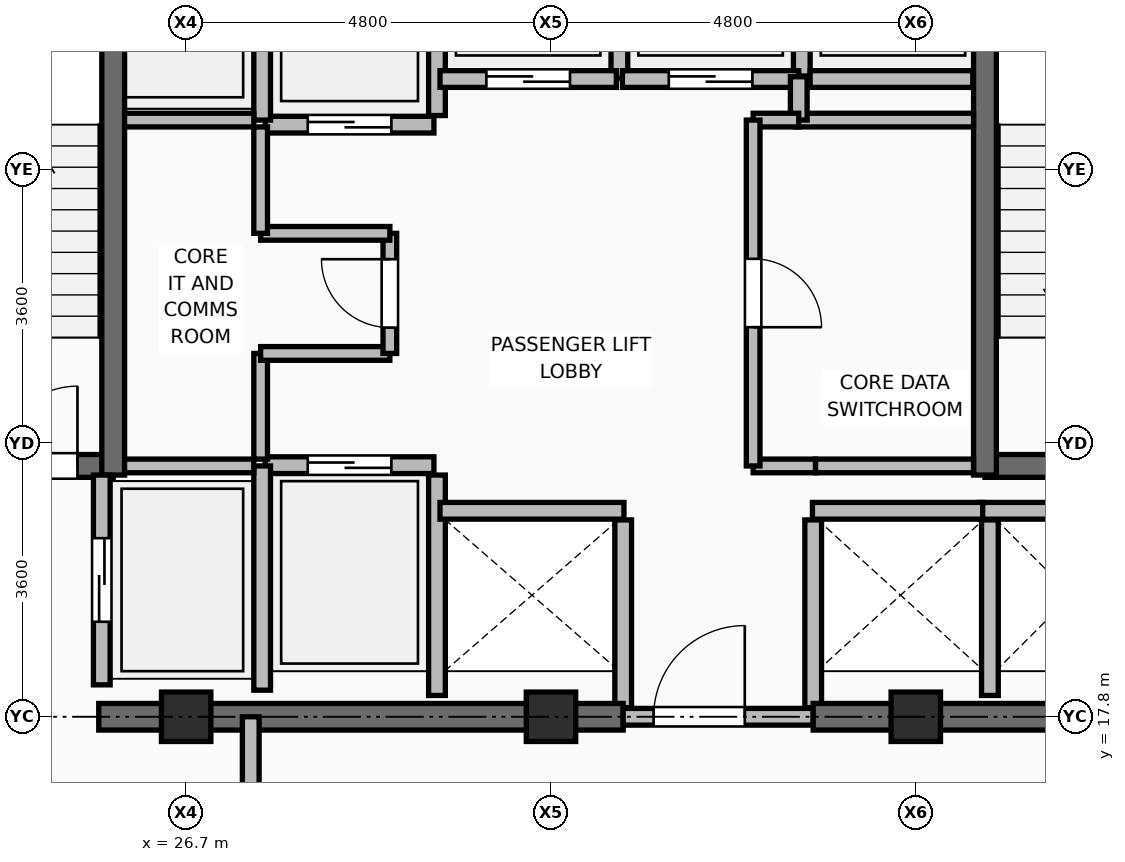
"""IFC4 building model, lengths in metres.
Left out: names, types, materials, properties, quantities, classifications, styles, units other than length and angle.
Written with IfcOpenShell. Run it as: python <this file> out.ifc"""

import sys

from ifc_helpers import new_model, si_unit, direction, frame, frame_2d, origin, origin_2d, place, context, subcontext, project, spatial, rectangle, extrude, element, fill, save


model = new_model("IFC4")
c1 = context("Model", 3, precision=1e-05, world=origin(), true_north=direction((0.0, 1.0)))
c2 = subcontext(c1, "Body", "Model", "MODEL_VIEW")
j1 = project(units=[si_unit("LENGTHUNIT", "METRE"), si_unit("PLANEANGLEUNIT", "RADIAN")], contexts=[c1])
p1 = place(None, origin())
s1 = spatial("IfcSite", under=j1, at=p1, CompositionType="ELEMENT")
p2 = place(p1, origin())
s2 = spatial("IfcBuilding", under=s1, at=p2, CompositionType="ELEMENT")
p3 = place(p2, frame((0.0, 0.0, 275.1)))
s3 = spatial("IfcBuildingStorey", under=s2, at=p3, CompositionType="ELEMENT", Elevation=275.1)
for number, where, z_axis, x_axis in (
    (1, (26.7, 17.8, 0.0), (0.0, 0.0, 1.0), (1.0, 0.0, 0.0)),
    (2, (31.5, 17.8, 0.0), (0.0, 0.0, 1.0), (1.0, 0.0, 0.0)),
    (3, (36.3, 17.8, 0.0), (0.0, 0.0, 1.0), (1.0, 0.0, 0.0)),
):
    element("IfcColumn", number, at=place(p3, frame(where, z_axis=z_axis, x_axis=x_axis)), inside=s3, PredefinedType="COLUMN", context=c2, shape_type="SweptSolid", body=[
        extrude(rectangle(XDim=0.65, YDim=0.65, at=origin_2d()), origin(), (0.0, 0.0, 1.0), 3.75),
    ])
p4 = place(p3, frame((30.0, 18.08, 0.0), z_axis=(0.0, 0.0, 1.0), x_axis=(0.0, 1.0, 0.0)))
e4 = element("IfcWall", 4, at=p4, inside=s3, PredefinedType="PARTITIONING", context=c2, shape_type="SweptSolid", body=[
    extrude(rectangle(XDim=2.9, YDim=0.22, at=frame_2d((1.45, 0.0))), origin(), (0.0, 0.0, 1.0), 3.545),
])
for number, where, z_axis, x_axis in (
    (5, (32.45, 17.92, 0.0), (0.0, 0.0, 1.0), (0.0, 1.0, 0.0)),
    (6, (34.95, 17.92, 0.0), (0.0, 0.0, 1.0), (0.0, 1.0, 0.0)),
):
    element("IfcWall", number, at=place(p3, frame(where, z_axis=z_axis, x_axis=x_axis)), inside=s3, PredefinedType="PARTITIONING", context=c2, shape_type="SweptSolid", body=[
        extrude(rectangle(XDim=2.47, YDim=0.22, at=frame_2d((1.235, 0.0))), origin(), (0.0, 0.0, 1.0), 3.545),
    ])
p5 = place(p3, frame((37.275, 18.08, 0.0), z_axis=(0.0, 0.0, 1.0), x_axis=(0.0, 1.0, 0.0)))
e7 = element("IfcWall", 7, at=p5, inside=s3, PredefinedType="PARTITIONING", context=c2, shape_type="SweptSolid", body=[
    extrude(rectangle(XDim=2.31, YDim=0.22, at=frame_2d((1.155, 0.0))), origin(), (0.0, 0.0, 1.0), 3.545),
])
p6 = place(p3, frame((30.0, 25.71, 0.0), z_axis=(0.0, 0.0, 1.0), x_axis=(0.0, 1.0, 0.0)))
e8 = element("IfcWall", 8, at=p6, inside=s3, PredefinedType="PARTITIONING", context=c2, shape_type="SweptSolid", body=[
    extrude(rectangle(XDim=2.73, YDim=0.22, at=frame_2d((1.365, 0.0))), origin(), (0.0, 0.0, 1.0), 3.545),
])
p7 = place(p3, frame((32.4, 26.2, 0.0), z_axis=(0.0, 0.0, 1.0), x_axis=(0.0, 1.0, 0.0)))
e9 = element("IfcWall", 9, at=p7, inside=s3, PredefinedType="PARTITIONING", context=c2, shape_type="SweptSolid", body=[
    extrude(rectangle(XDim=2.24, YDim=0.22, at=frame_2d((1.12, 0.0))), origin(), (0.0, 0.0, 1.0), 3.545),
])
p8 = place(p3, frame((34.8, 26.23, 0.0), z_axis=(0.0, 0.0, 1.0), x_axis=(0.0, 1.0, 0.0)))
e10 = element("IfcWall", 10, at=p8, inside=s3, PredefinedType="PARTITIONING", context=c2, shape_type="SweptSolid", body=[
    extrude(rectangle(XDim=2.21, YDim=0.22, at=frame_2d((1.105, 0.0))), origin(), (0.0, 0.0, 1.0), 3.545),
])
p9 = place(p3, frame((34.91, 26.19, 0.0), z_axis=(0.0, 0.0, 1.0), x_axis=(1.0, 0.0, 0.0)))
e11 = element("IfcWall", 11, at=p9, inside=s3, PredefinedType="PARTITIONING", context=c2, shape_type="SweptSolid", body=[
    extrude(rectangle(XDim=2.14, YDim=0.22, at=frame_2d((1.07, 0.0))), origin(), (0.0, 0.0, 1.0), 3.545),
])
p10 = place(p3, frame((25.55, 17.8, 0.0), z_axis=(0.0, 0.0, 1.0), x_axis=(1.0, 0.0, 0.0)))
e12 = element("IfcWall", 12, at=p10, inside=s3, PredefinedType="SHEAR", context=c2, shape_type="SweptSolid", body=[
    extrude(rectangle(XDim=6.9, YDim=0.35, at=frame_2d((3.45, 0.0))), origin(), (0.0, 0.0, 1.0), 3.57),
])
p11 = place(p3, frame((32.45, 17.8, 0.0), z_axis=(0.0, 0.0, 1.0), x_axis=(1.0, 0.0, 0.0)))
e13 = element("IfcWall", 13, at=p11, inside=s3, PredefinedType="PARTITIONING", context=c2, shape_type="SweptSolid", body=[
    extrude(rectangle(XDim=2.5, YDim=0.22, at=frame_2d((1.25, 0.0))), origin(), (0.0, 0.0, 1.0), 3.132),
])
p12 = place(p11, frame((0.4, 0.0, 0.0)))
e14 = element("IfcOpeningElement", 14, at=p12, cuts=e13, PredefinedType="OPENING", context=c2, shape_type="SweptSolid", body=[
    extrude(rectangle(XDim=1.2, YDim=2.1, at=frame_2d((0.6, 1.05))), frame((0.0, 0.12, 0.0), z_axis=(0.0, -1.0, 0.0), x_axis=(1.0, 0.0, 0.0)), (0.0, 0.0, 1.0), 0.24),
])
p13 = place(p3, frame((34.95, 17.8, 0.0), z_axis=(0.0, 0.0, 1.0), x_axis=(1.0, 0.0, 0.0)))
e15 = element("IfcWall", 15, at=p13, inside=s3, PredefinedType="SHEAR", context=c2, shape_type="SweptSolid", body=[
    extrude(rectangle(XDim=6.325, YDim=0.35, at=frame_2d((3.163, 0.0))), origin(), (0.0, 0.0, 1.0), 3.57),
])
p14 = place(p3, frame((22.075, 21.1, 0.0), z_axis=(0.0, 0.0, 1.0), x_axis=(1.0, 0.0, 0.0)))
e16 = element("IfcWall", 16, at=p14, inside=s3, PredefinedType="SHEAR", context=c2, shape_type="SweptSolid", body=[
    extrude(rectangle(XDim=3.665, YDim=0.3, at=frame_2d((1.833, 0.0))), origin(), (0.0, 0.0, 1.0), 3.57),
])
p15 = place(p14, frame((2.145, 0.0, 0.0)))
e17 = element("IfcOpeningElement", 17, at=p15, cuts=e16, PredefinedType="OPENING", context=c2, shape_type="SweptSolid", body=[
    extrude(rectangle(XDim=1.05, YDim=2.1, at=frame_2d((0.525, 1.05))), frame((0.0, 0.16, 0.0), z_axis=(0.0, -1.0, 0.0), x_axis=(1.0, 0.0, 0.0)), (0.0, 0.0, 1.0), 0.32),
])
p16 = place(p3, frame((25.74, 20.98, 0.0), z_axis=(0.0, 0.0, 1.0), x_axis=(0.0, 1.0, 0.0)))
e18 = element("IfcWall", 18, at=p16, inside=s3, PredefinedType="SHEAR", context=c2, shape_type="SweptSolid", body=[
    extrude(rectangle(XDim=7.99, YDim=0.3, at=frame_2d((3.995, 0.0))), origin(), (0.0, 0.0, 1.0), 3.57),
])
p17 = place(p3, frame((37.21, 21.1, 0.0), z_axis=(0.0, 0.0, 1.0), x_axis=(1.0, 0.0, 0.0)))
e19 = element("IfcWall", 19, at=p17, inside=s3, PredefinedType="SHEAR", context=c2, shape_type="SweptSolid", body=[
    extrude(rectangle(XDim=3.715, YDim=0.3, at=frame_2d((1.857, 0.0))), origin(), (0.0, 0.0, 1.0), 3.57),
])
p18 = place(p3, frame((37.21, 20.98, 0.0), z_axis=(0.0, 0.0, 1.0), x_axis=(0.0, 1.0, 0.0)))
e20 = element("IfcWall", 20, at=p18, inside=s3, PredefinedType="SHEAR", context=c2, shape_type="SweptSolid", body=[
    extrude(rectangle(XDim=7.99, YDim=0.3, at=frame_2d((3.995, 0.0))), origin(), (0.0, 0.0, 1.0), 3.57),
])
p19 = place(p3, frame((25.59, 18.22, 0.0), z_axis=(0.0, 0.0, 1.0), x_axis=(0.0, 1.0, 0.0)))
e21 = element("IfcWall", 21, at=p19, inside=s3, PredefinedType="PARTITIONING", context=c2, shape_type="SweptSolid", body=[
    extrude(rectangle(XDim=2.76, YDim=0.22, at=frame_2d((1.38, 0.0))), origin(), (0.0, 0.0, 1.0), 3.55),
])
p20 = place(p19, frame((0.83, 0.0, 0.0)))
e22 = element("IfcOpeningElement", 22, at=p20, cuts=e21, PredefinedType="OPENING", context=c2, shape_type="SweptSolid", body=[
    extrude(rectangle(XDim=1.1, YDim=2.2, at=frame_2d((0.55, 1.1))), frame((0.0, 0.12, 0.0), z_axis=(0.0, -1.0, 0.0), x_axis=(1.0, 0.0, 0.0)), (0.0, 0.0, 1.0), 0.24),
])
p21 = place(p3, frame((27.74, 21.11, 0.0), z_axis=(0.0, 0.0, 1.0), x_axis=(1.0, 0.0, 0.0)))
e23 = element("IfcWall", 23, at=p21, inside=s3, PredefinedType="PARTITIONING", context=c2, shape_type="SweptSolid", body=[
    extrude(rectangle(XDim=2.22, YDim=0.22, at=frame_2d((1.11, 0.0))), origin(), (0.0, 0.0, 1.0), 3.55),
])
p22 = place(p21, frame((0.56, 0.0, 0.0)))
e24 = element("IfcOpeningElement", 24, at=p22, cuts=e23, PredefinedType="OPENING", context=c2, shape_type="SweptSolid", body=[
    extrude(rectangle(XDim=1.1, YDim=2.2, at=frame_2d((0.55, 1.1))), frame((0.0, 0.12, 0.0), z_axis=(0.0, -1.0, 0.0), x_axis=(1.0, 0.0, 0.0)), (0.0, 0.0, 1.0), 0.24),
])
p23 = place(p3, frame((27.74, 25.59, 0.0), z_axis=(0.0, 0.0, 1.0), x_axis=(1.0, 0.0, 0.0)))
e25 = element("IfcWall", 25, at=p23, inside=s3, PredefinedType="PARTITIONING", context=c2, shape_type="SweptSolid", body=[
    extrude(rectangle(XDim=2.22, YDim=0.22, at=frame_2d((1.11, 0.0))), origin(), (0.0, 0.0, 1.0), 3.55),
])
p24 = place(p23, frame((0.56, 0.0, 0.0)))
e26 = element("IfcOpeningElement", 26, at=p24, cuts=e25, PredefinedType="OPENING", context=c2, shape_type="SweptSolid", body=[
    extrude(rectangle(XDim=1.1, YDim=2.2, at=frame_2d((0.55, 1.1))), frame((0.0, 0.12, 0.0), z_axis=(0.0, -1.0, 0.0), x_axis=(1.0, 0.0, 0.0)), (0.0, 0.0, 1.0), 0.24),
])
p25 = place(p3, frame((30.04, 20.51, 0.0), z_axis=(0.0, 0.0, 1.0), x_axis=(1.0, 0.0, 0.0)))
e27 = element("IfcWall", 27, at=p25, inside=s3, PredefinedType="PARTITIONING", context=c2, shape_type="SweptSolid", body=[
    extrude(rectangle(XDim=2.42, YDim=0.22, at=frame_2d((1.21, 0.0))), origin(), (0.0, 0.0, 1.0), 3.55),
])
for number, where, z_axis, x_axis in (
    (28, (37.14, 20.51, 0.0), (0.0, 0.0, 1.0), (1.0, 0.0, 0.0)),
    (29, (34.94, 20.51, 0.0), (0.0, 0.0, 1.0), (1.0, 0.0, 0.0)),
):
    element("IfcWall", number, at=place(p3, frame(where, z_axis=z_axis, x_axis=x_axis)), inside=s3, PredefinedType="PARTITIONING", context=c2, shape_type="SweptSolid", body=[
        extrude(rectangle(XDim=2.24, YDim=0.22, at=frame_2d((1.12, 0.0))), origin(), (0.0, 0.0, 1.0), 3.55),
    ])
p26 = place(p3, frame((30.04, 26.19, 0.0), z_axis=(0.0, 0.0, 1.0), x_axis=(1.0, 0.0, 0.0)))
e30 = element("IfcWall", 30, at=p26, inside=s3, PredefinedType="PARTITIONING", context=c2, shape_type="SweptSolid", body=[
    extrude(rectangle(XDim=2.32, YDim=0.22, at=frame_2d((1.16, 0.0))), origin(), (0.0, 0.0, 1.0), 3.55),
])
p27 = place(p26, frame((0.61, 0.0, 0.0)))
e31 = element("IfcOpeningElement", 31, at=p27, cuts=e30, PredefinedType="OPENING", context=c2, shape_type="SweptSolid", body=[
    extrude(rectangle(XDim=1.1, YDim=2.2, at=frame_2d((0.55, 1.1))), frame((0.0, 0.12, 0.0), z_axis=(0.0, -1.0, 0.0), x_axis=(1.0, 0.0, 0.0)), (0.0, 0.0, 1.0), 0.24),
])
p28 = place(p3, frame((32.44, 26.19, 0.0), z_axis=(0.0, 0.0, 1.0), x_axis=(1.0, 0.0, 0.0)))
e32 = element("IfcWall", 32, at=p28, inside=s3, PredefinedType="PARTITIONING", context=c2, shape_type="SweptSolid", body=[
    extrude(rectangle(XDim=2.32, YDim=0.22, at=frame_2d((1.16, 0.0))), origin(), (0.0, 0.0, 1.0), 3.55),
])
p29 = place(p28, frame((0.61, 0.0, 0.0)))
e33 = element("IfcOpeningElement", 33, at=p29, cuts=e32, PredefinedType="OPENING", context=c2, shape_type="SweptSolid", body=[
    extrude(rectangle(XDim=1.1, YDim=2.2, at=frame_2d((0.55, 1.1))), frame((0.0, 0.12, 0.0), z_axis=(0.0, -1.0, 0.0), x_axis=(1.0, 0.0, 0.0)), (0.0, 0.0, 1.0), 0.24),
])
p30 = place(p3, frame((27.7, 18.15, 0.0), z_axis=(0.0, 0.0, 1.0), x_axis=(0.0, 1.0, 0.0)))
e34 = element("IfcWall", 34, at=p30, inside=s3, PredefinedType="PARTITIONING", context=c2, shape_type="SweptSolid", body=[
    extrude(rectangle(XDim=2.95, YDim=0.22, at=frame_2d((1.475, 0.0))), origin(), (0.0, 0.0, 1.0), 3.55),
])
p31 = place(p3, frame((27.7, 25.65, 0.0), z_axis=(0.0, 0.0, 1.0), x_axis=(0.0, 1.0, 0.0)))
e35 = element("IfcWall", 35, at=p31, inside=s3, PredefinedType="PARTITIONING", context=c2, shape_type="SweptSolid", body=[
    extrude(rectangle(XDim=3.0, YDim=0.22, at=frame_2d((1.5, 0.0))), origin(), (0.0, 0.0, 1.0), 3.55),
])
for number, where, z_axis, x_axis in (
    (36, (25.89, 21.1, 0.0), (0.0, 0.0, 1.0), (1.0, 0.0, 0.0)),
    (37, (25.89, 25.65, 0.0), (0.0, 0.0, 1.0), (1.0, 0.0, 0.0)),
):
    element("IfcWall", number, at=place(p3, frame(where, z_axis=z_axis, x_axis=x_axis)), inside=s3, PredefinedType="PARTITIONING", context=c2, shape_type="SweptSolid", body=[
        extrude(rectangle(XDim=1.7, YDim=0.18, at=frame_2d((0.85, 0.0))), origin(), (0.0, 0.0, 1.0), 3.55),
    ])
p32 = place(p3, frame((27.68, 21.19, 0.0), z_axis=(0.0, 0.0, 1.0), x_axis=(0.0, 1.0, 0.0)))
e38 = element("IfcWall", 38, at=p32, inside=s3, PredefinedType="PARTITIONING", context=c2, shape_type="SweptSolid", body=[
    extrude(rectangle(XDim=1.39, YDim=0.18, at=frame_2d((0.695, 0.0))), origin(), (0.0, 0.0, 1.0), 3.55),
])
p33 = place(p3, frame((27.68, 22.58, 0.0), z_axis=(0.0, 0.0, 1.0), x_axis=(1.0, 0.0, 0.0)))
e39 = element("IfcWall", 39, at=p33, inside=s3, PredefinedType="PARTITIONING", context=c2, shape_type="SweptSolid", body=[
    extrude(rectangle(XDim=1.7, YDim=0.18, at=frame_2d((0.85, 0.0))), origin(), (0.0, 0.0, 1.0), 3.55),
])
p34 = place(p3, frame((29.38, 22.58, 0.0), z_axis=(0.0, 0.0, 1.0), x_axis=(0.0, 1.0, 0.0)))
e40 = element("IfcWall", 40, at=p34, inside=s3, PredefinedType="PARTITIONING", context=c2, shape_type="SweptSolid", body=[
    extrude(rectangle(XDim=1.58, YDim=0.18, at=frame_2d((0.79, 0.0))), origin(), (0.0, 0.0, 1.0), 3.55),
])
p35 = place(p34, frame((0.34, 0.0, 0.0)))
e41 = element("IfcOpeningElement", 41, at=p35, cuts=e40, PredefinedType="OPENING", context=c2, shape_type="SweptSolid", body=[
    extrude(rectangle(XDim=0.9, YDim=2.1, at=frame_2d((0.45, 1.05))), frame((0.0, 0.1, 0.0), z_axis=(0.0, -1.0, 0.0), x_axis=(1.0, 0.0, 0.0)), (0.0, 0.0, 1.0), 0.2),
])
p36 = place(p3, frame((27.68, 24.16, 0.0), z_axis=(0.0, 0.0, 1.0), x_axis=(1.0, 0.0, 0.0)))
e42 = element("IfcWall", 42, at=p36, inside=s3, PredefinedType="PARTITIONING", context=c2, shape_type="SweptSolid", body=[
    extrude(rectangle(XDim=1.7, YDim=0.18, at=frame_2d((0.85, 0.0))), origin(), (0.0, 0.0, 1.0), 3.55),
])
p37 = place(p3, frame((27.68, 24.16, 0.0), z_axis=(0.0, 0.0, 1.0), x_axis=(0.0, 1.0, 0.0)))
e43 = element("IfcWall", 43, at=p37, inside=s3, PredefinedType="PARTITIONING", context=c2, shape_type="SweptSolid", body=[
    extrude(rectangle(XDim=1.4, YDim=0.18, at=frame_2d((0.7, 0.0))), origin(), (0.0, 0.0, 1.0), 3.55),
])
p38 = place(p3, frame((34.98, 21.1, 0.0), z_axis=(0.0, 0.0, 1.0), x_axis=(1.0, 0.0, 0.0)))
e44 = element("IfcWall", 44, at=p38, inside=s3, PredefinedType="PARTITIONING", context=c2, shape_type="SweptSolid", body=[
    extrude(rectangle(XDim=2.08, YDim=0.18, at=frame_2d((1.04, 0.0))), origin(), (0.0, 0.0, 1.0), 3.55),
])
p39 = place(p3, frame((34.72, 25.65, 0.0), z_axis=(0.0, 0.0, 1.0), x_axis=(1.0, 0.0, 0.0)))
e45 = element("IfcWall", 45, at=p39, inside=s3, PredefinedType="PARTITIONING", context=c2, shape_type="SweptSolid", body=[
    extrude(rectangle(XDim=2.34, YDim=0.18, at=frame_2d((1.17, 0.0))), origin(), (0.0, 0.0, 1.0), 3.55),
])
p40 = place(p3, frame((34.76, 25.65, 0.0), z_axis=(0.0, 0.0, 1.0), x_axis=(0.0, 1.0, 0.0)))
e46 = element("IfcWall", 46, at=p40, inside=s3, PredefinedType="PARTITIONING", context=c2, shape_type="SweptSolid", body=[
    extrude(rectangle(XDim=0.57, YDim=0.22, at=frame_2d((0.285, 0.0))), origin(), (0.0, 0.0, 1.0), 3.55),
])
p41 = place(p3, frame((34.16, 21.1, 0.0), z_axis=(0.0, 0.0, 1.0), x_axis=(1.0, 0.0, 0.0)))
e47 = element("IfcWall", 47, at=p41, inside=s3, PredefinedType="PARTITIONING", context=c2, shape_type="SweptSolid", body=[
    extrude(rectangle(XDim=0.82, YDim=0.18, at=frame_2d((0.41, 0.0))), origin(), (0.0, 0.0, 1.0), 3.55),
])
p42 = place(p3, frame((34.16, 25.65, 0.0), z_axis=(0.0, 0.0, 1.0), x_axis=(1.0, 0.0, 0.0)))
e48 = element("IfcWall", 48, at=p42, inside=s3, PredefinedType="PARTITIONING", context=c2, shape_type="SweptSolid", body=[
    extrude(rectangle(XDim=0.6, YDim=0.18, at=frame_2d((0.3, 0.0))), origin(), (0.0, 0.0, 1.0), 3.55),
])
p43 = place(p3, frame((34.16, 21.1, 0.0), z_axis=(0.0, 0.0, 1.0), x_axis=(0.0, 1.0, 0.0)))
e49 = element("IfcWall", 49, at=p43, inside=s3, PredefinedType="PARTITIONING", context=c2, shape_type="SweptSolid", body=[
    extrude(rectangle(XDim=4.55, YDim=0.18, at=frame_2d((2.275, 0.0))), origin(), (0.0, 0.0, 1.0), 3.55),
])
p44 = place(p43, frame((1.825, 0.0, 0.0)))
e50 = element("IfcOpeningElement", 50, at=p44, cuts=e49, PredefinedType="OPENING", context=c2, shape_type="SweptSolid", body=[
    extrude(rectangle(XDim=0.9, YDim=2.1, at=frame_2d((0.45, 1.05))), frame((0.0, 0.1, 0.0), z_axis=(0.0, -1.0, 0.0), x_axis=(1.0, 0.0, 0.0)), (0.0, 0.0, 1.0), 0.2),
])
p45 = place(p3, frame((27.55, 14.35, 0.0), z_axis=(0.0, 0.0, 1.0), x_axis=(0.0, 1.0, 0.0)))
e51 = element("IfcWall", 51, at=p45, inside=s3, PredefinedType="PARTITIONING", context=c2, shape_type="SweptSolid", body=[
    extrude(rectangle(XDim=3.45, YDim=0.22, at=frame_2d((1.725, 0.0))), origin(), (0.0, 0.0, 1.0), 3.132),
])
p46 = place(p45, frame((1.175, 0.0, 0.0)))
e52 = element("IfcOpeningElement", 52, at=p46, cuts=e51, PredefinedType="OPENING", context=c2, shape_type="SweptSolid", body=[
    extrude(rectangle(XDim=1.1, YDim=2.1, at=frame_2d((0.55, 1.05))), frame((0.0, 0.12, 0.0), z_axis=(0.0, -1.0, 0.0), x_axis=(1.0, 0.0, 0.0)), (0.0, 0.0, 1.0), 0.24),
])
p47 = place(p12, origin())
e53 = element("IfcDoor", 53, at=p47, inside=s3, OperationType="SINGLE_SWING_RIGHT", PredefinedType="DOOR", context=c2, shape_type="SweptSolid", body=[
    extrude(rectangle(XDim=1.2, YDim=2.1, at=frame_2d((0.6, 1.05))), frame((0.0, 0.025, 0.0), z_axis=(0.0, -1.0, 0.0), x_axis=(1.0, 0.0, 0.0)), (0.0, 0.0, 1.0), 0.05),
])
fill(e14, e53)
p48 = place(p15, origin())
e54 = element("IfcDoor", 54, at=p48, inside=s3, OperationType="SINGLE_SWING_RIGHT", PredefinedType="DOOR", context=c2, shape_type="SweptSolid", body=[
    extrude(rectangle(XDim=1.05, YDim=2.1, at=frame_2d((0.525, 1.05))), frame((0.0, 0.025, 0.0), z_axis=(0.0, -1.0, 0.0), x_axis=(1.0, 0.0, 0.0)), (0.0, 0.0, 1.0), 0.05),
])
fill(e17, e54)
p49 = place(p20, origin())
e55 = element("IfcDoor", 55, at=p49, inside=s3, OperationType="DOUBLE_DOOR_SLIDING", PredefinedType="DOOR", context=c2, shape_type="SweptSolid", body=[
    extrude(rectangle(XDim=1.1, YDim=2.2, at=frame_2d((0.55, 1.1))), frame((0.0, 0.025, 0.0), z_axis=(0.0, -1.0, 0.0), x_axis=(1.0, 0.0, 0.0)), (0.0, 0.0, 1.0), 0.05),
])
fill(e22, e55)
p50 = place(p22, origin())
e56 = element("IfcDoor", 56, at=p50, inside=s3, OperationType="DOUBLE_DOOR_SLIDING", PredefinedType="DOOR", context=c2, shape_type="SweptSolid", body=[
    extrude(rectangle(XDim=1.1, YDim=2.2, at=frame_2d((0.55, 1.1))), frame((0.0, 0.025, 0.0), z_axis=(0.0, -1.0, 0.0), x_axis=(1.0, 0.0, 0.0)), (0.0, 0.0, 1.0), 0.05),
])
fill(e24, e56)
p51 = place(p24, frame((1.1, 0.0, 0.0), z_axis=(0.0, 0.0, 1.0), x_axis=(-1.0, 0.0, 0.0)))
e57 = element("IfcDoor", 57, at=p51, inside=s3, OperationType="DOUBLE_DOOR_SLIDING", PredefinedType="DOOR", context=c2, shape_type="SweptSolid", body=[
    extrude(rectangle(XDim=1.1, YDim=2.2, at=frame_2d((0.55, 1.1))), frame((0.0, 0.025, 0.0), z_axis=(0.0, -1.0, 0.0), x_axis=(1.0, 0.0, 0.0)), (0.0, 0.0, 1.0), 0.05),
])
fill(e26, e57)
p52 = place(p27, frame((1.1, 0.0, 0.0), z_axis=(0.0, 0.0, 1.0), x_axis=(-1.0, 0.0, 0.0)))
e58 = element("IfcDoor", 58, at=p52, inside=s3, OperationType="DOUBLE_DOOR_SLIDING", PredefinedType="DOOR", context=c2, shape_type="SweptSolid", body=[
    extrude(rectangle(XDim=1.1, YDim=2.2, at=frame_2d((0.55, 1.1))), frame((0.0, 0.025, 0.0), z_axis=(0.0, -1.0, 0.0), x_axis=(1.0, 0.0, 0.0)), (0.0, 0.0, 1.0), 0.05),
])
fill(e31, e58)
p53 = place(p29, frame((1.1, 0.0, 0.0), z_axis=(0.0, 0.0, 1.0), x_axis=(-1.0, 0.0, 0.0)))
e59 = element("IfcDoor", 59, at=p53, inside=s3, OperationType="DOUBLE_DOOR_SLIDING", PredefinedType="DOOR", context=c2, shape_type="SweptSolid", body=[
    extrude(rectangle(XDim=1.1, YDim=2.2, at=frame_2d((0.55, 1.1))), frame((0.0, 0.025, 0.0), z_axis=(0.0, -1.0, 0.0), x_axis=(1.0, 0.0, 0.0)), (0.0, 0.0, 1.0), 0.05),
])
fill(e33, e59)
p54 = place(p35, origin())
e60 = element("IfcDoor", 60, at=p54, inside=s3, OperationType="SINGLE_SWING_RIGHT", PredefinedType="DOOR", context=c2, shape_type="SweptSolid", body=[
    extrude(rectangle(XDim=0.9, YDim=2.1, at=frame_2d((0.45, 1.05))), frame((0.0, 0.025, 0.0), z_axis=(0.0, -1.0, 0.0), x_axis=(1.0, 0.0, 0.0)), (0.0, 0.0, 1.0), 0.05),
])
fill(e41, e60)
p55 = place(p44, frame((0.9, 0.0, 0.0), z_axis=(0.0, 0.0, 1.0), x_axis=(-1.0, 0.0, 0.0)))
e61 = element("IfcDoor", 61, at=p55, inside=s3, OperationType="SINGLE_SWING_RIGHT", PredefinedType="DOOR", context=c2, shape_type="SweptSolid", body=[
    extrude(rectangle(XDim=0.9, YDim=2.1, at=frame_2d((0.45, 1.05))), frame((0.0, 0.025, 0.0), z_axis=(0.0, -1.0, 0.0), x_axis=(1.0, 0.0, 0.0)), (0.0, 0.0, 1.0), 0.05),
])
fill(e50, e61)
save(model, sys.argv[1])
